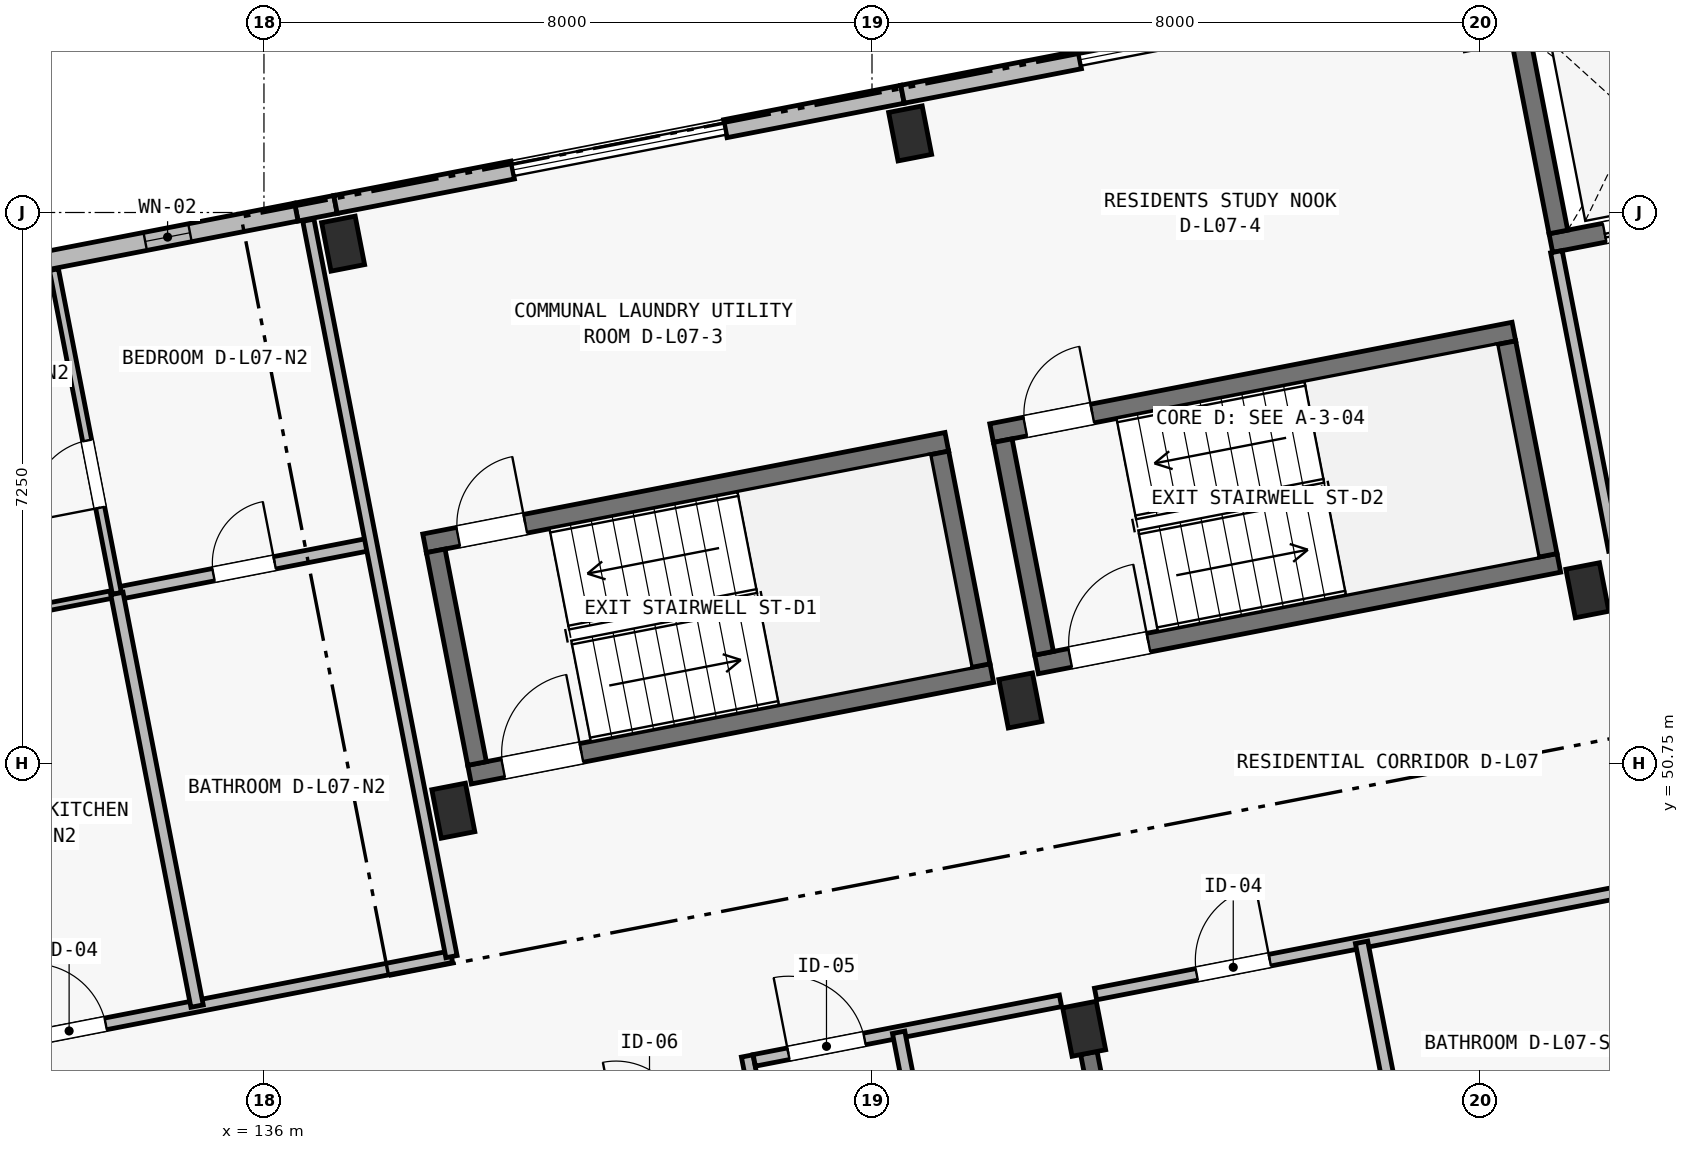
"""IFC4 building model, lengths in metres.
Left out: names, types, materials, properties, quantities, classifications, styles, units other than length and angle.
Written with IfcOpenShell. Run it as: python <this file> out.ifc"""

import sys

from ifc_helpers import new_model, si_unit, direction, frame, frame_2d, origin, origin_2d, place, context, subcontext, project, spatial, polyline, rectangle, outline, extrude, element, fill, save


model = new_model("IFC4")
c1 = context("Model", 3, precision=1e-05, world=origin(), true_north=direction((0.0, 1.0)))
c2 = subcontext(c1, "Body", "Model", "MODEL_VIEW")
j1 = project(units=[si_unit("LENGTHUNIT", "METRE"), si_unit("PLANEANGLEUNIT", "RADIAN")], contexts=[c1])
p1 = place(None, origin())
s1 = spatial("IfcSite", under=j1, at=p1, CompositionType="ELEMENT")
p2 = place(p1, origin())
s2 = spatial("IfcBuilding", under=s1, at=p2, CompositionType="ELEMENT")
p3 = place(p2, frame((0.0, 0.0, 24.65)))
s3 = spatial("IfcBuildingStorey", under=s2, at=p3, CompositionType="ELEMENT", Elevation=24.65)
for number, where, z_axis, x_axis in (
    (1, (138.491, 50.13, 0.0), (0.0, 0.0, 1.0), (0.982, 0.191, 0.0)),
    (2, (137.041, 57.59, 0.0), (0.0, 0.0, 1.0), (0.982, 0.191, 0.0)),
    (3, (146.791, 47.261, 0.0), (0.0, 0.0, 1.0), (0.982, 0.191, 0.0)),
    (4, (145.952, 51.58, 0.0), (0.0, 0.0, 1.0), (0.982, 0.191, 0.0)),
    (5, (144.502, 59.041, 0.0), (0.0, 0.0, 1.0), (0.982, 0.191, 0.0)),
    (6, (153.412, 53.03, 0.0), (0.0, 0.0, 1.0), (0.982, 0.191, 0.0)),
):
    element("IfcColumn", number, at=place(p3, frame(where, z_axis=z_axis, x_axis=x_axis)), inside=s3, PredefinedType="COLUMN", context=c2, shape_type="SweptSolid", body=[
        extrude(rectangle(XDim=0.45, YDim=0.65, at=origin_2d()), origin(), (0.0, 0.0, 1.0), 3.25),
    ])
p4 = place(p3, frame((148.179, 40.12, 0.0), z_axis=(0.0, 0.0, 1.0), x_axis=(-0.190817005532, 0.981625626397, 0.0)))
e7 = element("IfcWall", 7, at=p4, inside=s3, PredefinedType="SHEAR", context=c2, shape_type="SweptSolid", body=[
    extrude(rectangle(XDim=6.95, YDim=0.22, at=frame_2d((3.475, 0.0))), origin(), (0.0, 0.0, 1.0), 2.5),
])
p5 = place(p3, frame((152.932, 57.598, 0.0), z_axis=(0.0, 0.0, 1.0), x_axis=(0.981636759622, 0.190759723627, 0.0)))
e8 = element("IfcWall", 8, at=p5, inside=s3, PredefinedType="SHEAR", context=c2, shape_type="SweptSolid", body=[
    extrude(rectangle(XDim=2.675, YDim=0.25, at=frame_2d((1.337, 0.0))), origin(), (0.0, 0.0, 1.0), 3.25),
])
p6 = place(p5, frame((0.72, 0.0, 0.0)))
e9 = element("IfcOpeningElement", 9, at=p6, cuts=e8, PredefinedType="OPENING", context=c2, shape_type="SweptSolid", body=[
    extrude(rectangle(XDim=1.2, YDim=2.2, at=frame_2d((0.6, 1.1))), frame((0.0, 0.14, 0.0), z_axis=(0.0, -1.0, 0.0), x_axis=(1.0, 0.0, 0.0)), (0.0, 0.0, 1.0), 0.28),
])
p7 = place(p3, frame((153.031, 57.744, 0.0), z_axis=(0.0, 0.0, 1.0), x_axis=(-0.190810719655, 0.98162684828, 0.0)))
e10 = element("IfcWall", 10, at=p7, inside=s3, PredefinedType="SHEAR", context=c2, shape_type="SweptSolid", body=[
    extrude(rectangle(XDim=2.55, YDim=0.25, at=frame_2d((1.275, 0.0))), origin(), (0.0, 0.0, 1.0), 3.25),
])
p8 = place(p3, frame((138.113, 53.647, 0.0), z_axis=(0.0, 0.0, 1.0), x_axis=(0.981626097708, 0.19081458094, 0.0)))
e11 = element("IfcWall", 11, at=p8, inside=s3, PredefinedType="SHEAR", context=c2, shape_type="SweptSolid", body=[
    extrude(rectangle(XDim=7.0, YDim=0.25, at=frame_2d((3.5, 0.0))), origin(), (0.0, 0.0, 1.0), 3.25),
])
p9 = place(p8, frame((0.45, 0.0, 0.0)))
e12 = element("IfcOpeningElement", 12, at=p9, cuts=e11, PredefinedType="OPENING", context=c2, shape_type="SweptSolid", body=[
    extrude(rectangle(XDim=0.9, YDim=2.1, at=frame_2d((0.45, 1.05))), frame((0.0, 0.14, 0.0), z_axis=(0.0, -1.0, 0.0), x_axis=(1.0, 0.0, 0.0)), (0.0, 0.0, 1.0), 0.28),
])
p10 = place(p3, frame((138.705, 50.604, 0.0), z_axis=(0.0, 0.0, 1.0), x_axis=(0.981626097708, 0.19081458094, 0.0)))
e13 = element("IfcWall", 13, at=p10, inside=s3, PredefinedType="SHEAR", context=c2, shape_type="SweptSolid", body=[
    extrude(rectangle(XDim=7.0, YDim=0.25, at=frame_2d((3.5, 0.0))), origin(), (0.0, 0.0, 1.0), 3.25),
])
p11 = place(p10, frame((0.45, 0.0, 0.0)))
e14 = element("IfcOpeningElement", 14, at=p11, cuts=e13, PredefinedType="OPENING", context=c2, shape_type="SweptSolid", body=[
    extrude(rectangle(XDim=1.05, YDim=2.15, at=frame_2d((0.525, 1.075))), frame((0.0, 0.14, 0.0), z_axis=(0.0, -1.0, 0.0), x_axis=(1.0, 0.0, 0.0)), (0.0, 0.0, 1.0), 0.28),
])
p12 = place(p3, frame((138.804, 50.751, 0.0), z_axis=(0.0, 0.0, 1.0), x_axis=(-0.190858194834, 0.981617618762, 0.0)))
e15 = element("IfcWall", 15, at=p12, inside=s3, PredefinedType="SHEAR", context=c2, shape_type="SweptSolid", body=[
    extrude(rectangle(XDim=2.85, YDim=0.25, at=frame_2d((1.425, 0.0))), origin(), (0.0, 0.0, 1.0), 3.25),
])
p13 = place(p3, frame((145.43, 52.039, 0.0), z_axis=(0.0, 0.0, 1.0), x_axis=(-0.190842147128, 0.981620738819, 0.0)))
e16 = element("IfcWall", 16, at=p13, inside=s3, PredefinedType="SHEAR", context=c2, shape_type="SweptSolid", body=[
    extrude(rectangle(XDim=2.85, YDim=0.25, at=frame_2d((1.425, 0.0))), origin(), (0.0, 0.0, 1.0), 3.25),
])
p14 = place(p3, frame((145.574, 55.098, 0.0), z_axis=(0.0, 0.0, 1.0), x_axis=(0.981626097708, 0.19081458094, 0.0)))
e17 = element("IfcWall", 17, at=p14, inside=s3, PredefinedType="SHEAR", context=c2, shape_type="SweptSolid", body=[
    extrude(rectangle(XDim=7.0, YDim=0.25, at=frame_2d((3.5, 0.0))), origin(), (0.0, 0.0, 1.0), 3.25),
])
p15 = place(p14, frame((0.45, 0.0, 0.0)))
e18 = element("IfcOpeningElement", 18, at=p15, cuts=e17, PredefinedType="OPENING", context=c2, shape_type="SweptSolid", body=[
    extrude(rectangle(XDim=0.9, YDim=2.1, at=frame_2d((0.45, 1.05))), frame((0.0, 0.14, 0.0), z_axis=(0.0, -1.0, 0.0), x_axis=(1.0, 0.0, 0.0)), (0.0, 0.0, 1.0), 0.28),
])
p16 = place(p3, frame((146.165, 52.054, 0.0), z_axis=(0.0, 0.0, 1.0), x_axis=(0.981627367538, 0.190808048312, 0.0)))
e19 = element("IfcWall", 19, at=p16, inside=s3, PredefinedType="SHEAR", context=c2, shape_type="SweptSolid", body=[
    extrude(rectangle(XDim=7.0, YDim=0.25, at=frame_2d((3.5, 0.0))), origin(), (0.0, 0.0, 1.0), 3.25),
])
p17 = place(p16, frame((0.45, 0.0, 0.0)))
e20 = element("IfcOpeningElement", 20, at=p17, cuts=e19, PredefinedType="OPENING", context=c2, shape_type="SweptSolid", body=[
    extrude(rectangle(XDim=1.05, YDim=2.15, at=frame_2d((0.525, 1.075))), frame((0.0, 0.14, 0.0), z_axis=(0.0, -1.0, 0.0), x_axis=(1.0, 0.0, 0.0)), (0.0, 0.0, 1.0), 0.28),
])
for number, where, z_axis, x_axis in (
    (21, (146.264, 52.201, 0.0), (0.0, 0.0, 1.0), (-0.191, 0.982, 0.0)),
    (22, (152.89, 53.489, 0.0), (0.0, 0.0, 1.0), (-0.191, 0.982, 0.0)),
):
    element("IfcWall", number, at=place(p3, frame(where, z_axis=z_axis, x_axis=x_axis)), inside=s3, PredefinedType="SHEAR", context=c2, shape_type="SweptSolid", body=[
        extrude(rectangle(XDim=2.85, YDim=0.25, at=frame_2d((1.425, 0.0))), origin(), (0.0, 0.0, 1.0), 3.25),
    ])
p18 = place(p3, frame((136.426, 58.006, 0.0), z_axis=(0.0, 0.0, 1.0), x_axis=(0.981656509867, 0.190658062077, 0.0)))
e23 = element("IfcWall", 23, at=p18, inside=s3, PredefinedType="SOLIDWALL", context=c2, shape_type="SweptSolid", body=[
    extrude(rectangle(XDim=0.525, YDim=0.24, at=frame_2d((0.262, 0.0))), origin(), (0.0, 0.0, 1.0), 3.0),
])
p19 = place(p3, frame((129.481, 56.656, 0.0), z_axis=(0.0, 0.0, 1.0), x_axis=(0.981624188584, 0.190824401971, 0.0)))
e24 = element("IfcWall", 24, at=p19, inside=s3, PredefinedType="SOLIDWALL", context=c2, shape_type="SweptSolid", body=[
    extrude(outline(polyline([(0.0, 0.0), (7.075, 0.0), (7.075, 6.555), (0.0, 5.091), (0.0, 0.0)])), frame((0.0, 0.12, 0.0), z_axis=(0.0, -1.0, 0.0), x_axis=(1.0, 0.0, 0.0)), (0.0, 0.0, 1.0), 0.24),
])
p20 = place(p19, frame((1.745, 0.0, 0.5)))
e25 = element("IfcOpeningElement", 25, at=p20, cuts=e24, PredefinedType="OPENING", context=c2, shape_type="SweptSolid", body=[
    extrude(rectangle(XDim=0.82, YDim=2.18, at=frame_2d((0.41, 1.09))), frame((0.0, 0.135, 0.0), z_axis=(0.0, -1.0, 0.0), x_axis=(1.0, 0.0, 0.0)), (0.0, 0.0, 1.0), 0.27),
])
p21 = place(p19, frame((5.05, 0.0, 0.44)))
e26 = element("IfcOpeningElement", 26, at=p21, cuts=e24, PredefinedType="OPENING", context=c2, shape_type="SweptSolid", body=[
    extrude(rectangle(XDim=0.6, YDim=2.22, at=frame_2d((0.3, 1.11))), frame((0.0, 0.135, 0.0), z_axis=(0.0, -1.0, 0.0), x_axis=(1.0, 0.0, 0.0)), (0.0, 0.0, 1.0), 0.27),
])
for number, where, z_axis, x_axis in (
    (27, (136.941, 58.106, 0.0), (0.0, 0.0, 1.0), (0.982, 0.191, 0.0)),
    (28, (142.07, 59.103, 0.0), (0.0, 0.0, 1.0), (0.982, 0.191, 0.0)),
):
    element("IfcWall", number, at=place(p3, frame(where, z_axis=z_axis, x_axis=x_axis)), inside=s3, PredefinedType="SOLIDWALL", context=c2, shape_type="SweptSolid", body=[
        extrude(rectangle(XDim=2.375, YDim=0.24, at=frame_2d((1.188, 0.0))), origin(), (0.0, 0.0, 1.0), 3.0),
    ])
p22 = place(p3, frame((144.401, 59.556, 0.0), z_axis=(0.0, 0.0, 1.0), x_axis=(0.981633573872, 0.190776116556, 0.0)))
e29 = element("IfcWall", 29, at=p22, inside=s3, PredefinedType="SOLIDWALL", context=c2, shape_type="SweptSolid", body=[
    extrude(rectangle(XDim=2.375, YDim=0.24, at=frame_2d((1.188, 0.0))), origin(), (0.0, 0.0, 1.0), 3.0),
])
p23 = place(p3, frame((153.768, 53.558, 0.0), z_axis=(0.0, 0.0, 1.0), x_axis=(-0.19085495634, 0.981618248425, 0.0)))
e30 = element("IfcWall", 30, at=p23, inside=s3, PredefinedType="PARTITIONING", context=c2, shape_type="SweptSolid", body=[
    extrude(rectangle(XDim=4.0, YDim=0.155, at=frame_2d((2.0, 0.0))), origin(), (0.0, 0.0, 1.0), 2.97),
])
p24 = place(p3, frame((142.548, 45.927, 0.0), z_axis=(0.0, 0.0, 1.0), x_axis=(-0.190639805817, 0.981660055436, 0.0)))
e31 = element("IfcWall", 31, at=p24, inside=s3, PredefinedType="PARTITIONING", context=c2, shape_type="SweptSolid", body=[
    extrude(rectangle(XDim=0.995, YDim=0.155, at=frame_2d((0.498, 0.0))), origin(), (0.0, 0.0, 1.0), 2.97),
])
p25 = place(p3, frame((142.451, 46.845, 0.0), z_axis=(0.0, 0.0, 1.0), x_axis=(0.981629934904, 0.190794839817, 0.0)))
e32 = element("IfcWall", 32, at=p25, inside=s3, PredefinedType="PARTITIONING", context=c2, shape_type="SweptSolid", body=[
    extrude(rectangle(XDim=4.105, YDim=0.155, at=frame_2d((2.052, 0.0))), origin(), (0.0, 0.0, 1.0), 2.97),
])
p26 = place(p25, frame((0.458, 0.0, 0.0)))
e33 = element("IfcOpeningElement", 33, at=p26, cuts=e32, PredefinedType="OPENING", context=c2, shape_type="SweptSolid", body=[
    extrude(rectangle(XDim=1.02, YDim=2.2, at=frame_2d((0.51, 1.1))), frame((0.0, 0.093, 0.0), z_axis=(0.0, -1.0, 0.0), x_axis=(1.0, 0.0, 0.0)), (0.0, 0.0, 1.0), 0.185),
])
p27 = place(p3, frame((145.127, 43.219, 0.0), z_axis=(0.0, 0.0, 1.0), x_axis=(-0.19081827974, 0.981625378705, 0.0)))
e34 = element("IfcWall", 34, at=p27, inside=s3, PredefinedType="PLUMBINGWALL", context=c2, shape_type="SweptSolid", body=[
    extrude(rectangle(XDim=4.07, YDim=0.165, at=frame_2d((2.035, 0.0))), origin(), (0.0, 0.0, 1.0), 2.97),
])
p28 = place(p3, frame((146.942, 47.718, 0.0), z_axis=(0.0, 0.0, 1.0), x_axis=(0.981623942594, 0.190825667367, 0.0)))
e35 = element("IfcWall", 35, at=p28, inside=s3, PredefinedType="PARTITIONING", context=c2, shape_type="SweptSolid", body=[
    extrude(rectangle(XDim=7.13, YDim=0.155, at=frame_2d((3.565, 0.0))), origin(), (0.0, 0.0, 1.0), 2.97),
])
p29 = place(p28, frame((1.355, 0.0, 0.0)))
e36 = element("IfcOpeningElement", 36, at=p29, cuts=e35, PredefinedType="OPENING", context=c2, shape_type="SweptSolid", body=[
    extrude(rectangle(XDim=0.98, YDim=2.15, at=frame_2d((0.49, 1.075))), frame((0.0, 0.093, 0.0), z_axis=(0.0, -1.0, 0.0), x_axis=(1.0, 0.0, 0.0)), (0.0, 0.0, 1.0), 0.185),
])
p30 = place(p3, frame((151.218, 44.403, 0.0), z_axis=(0.0, 0.0, 1.0), x_axis=(-0.190807044121, 0.981627562731, 0.0)))
e37 = element("IfcWall", 37, at=p30, inside=s3, PredefinedType="PLUMBINGWALL", context=c2, shape_type="SweptSolid", body=[
    extrude(rectangle(XDim=4.07, YDim=0.165, at=frame_2d((2.035, 0.0))), origin(), (0.0, 0.0, 1.0), 2.97),
])
p31 = place(p3, frame((131.772, 46.909, 0.0), z_axis=(0.0, 0.0, 1.0), x_axis=(0.981622468528, 0.190833249935, 0.0)))
e38 = element("IfcWall", 38, at=p31, inside=s3, PredefinedType="PARTITIONING", context=c2, shape_type="SweptSolid", body=[
    extrude(rectangle(XDim=6.82, YDim=0.155, at=frame_2d((3.41, 0.0))), origin(), (0.0, 0.0, 1.0), 2.97),
])
p32 = place(p31, frame((1.205, 0.0, 0.0)))
e39 = element("IfcOpeningElement", 39, at=p32, cuts=e38, PredefinedType="OPENING", context=c2, shape_type="SweptSolid", body=[
    extrude(rectangle(XDim=0.98, YDim=2.15, at=frame_2d((0.49, 1.075))), frame((0.0, 0.093, 0.0), z_axis=(0.0, -1.0, 0.0), x_axis=(1.0, 0.0, 0.0)), (0.0, 0.0, 1.0), 0.185),
])
p33 = place(p3, frame((130.717, 52.337, 0.0), z_axis=(0.0, 0.0, 1.0), x_axis=(0.981629173664, 0.190798756314, 0.0)))
e40 = element("IfcWall", 40, at=p33, inside=s3, PredefinedType="PARTITIONING", context=c2, shape_type="SweptSolid", body=[
    extrude(rectangle(XDim=3.41, YDim=0.1, at=frame_2d((1.705, 0.0))), origin(), (0.0, 0.0, 1.0), 2.97),
])
p34 = place(p33, frame((1.255, 0.0, 0.0)))
e41 = element("IfcOpeningElement", 41, at=p34, cuts=e40, PredefinedType="OPENING", context=c2, shape_type="SweptSolid", body=[
    extrude(rectangle(XDim=0.88, YDim=2.1, at=frame_2d((0.44, 1.05))), frame((0.0, 0.065, 0.0), z_axis=(0.0, -1.0, 0.0), x_axis=(1.0, 0.0, 0.0)), (0.0, 0.0, 1.0), 0.13),
])
p35 = place(p3, frame((134.065, 52.988, 0.0), z_axis=(0.0, 0.0, 1.0), x_axis=(0.981629173664, 0.190798756314, 0.0)))
e42 = element("IfcWall", 42, at=p35, inside=s3, PredefinedType="PLUMBINGWALL", context=c2, shape_type="SweptSolid", body=[
    extrude(rectangle(XDim=3.41, YDim=0.165, at=frame_2d((1.705, 0.0))), origin(), (0.0, 0.0, 1.0), 2.97),
])
p36 = place(p35, frame((1.295, 0.0, 0.0)))
e43 = element("IfcOpeningElement", 43, at=p36, cuts=e42, PredefinedType="OPENING", context=c2, shape_type="SweptSolid", body=[
    extrude(rectangle(XDim=0.82, YDim=2.08, at=frame_2d((0.41, 1.04))), frame((0.0, 0.097, 0.0), z_axis=(0.0, -1.0, 0.0), x_axis=(1.0, 0.0, 0.0)), (0.0, 0.0, 1.0), 0.195),
])
p37 = place(p3, frame((134.065, 52.988, 0.0), z_axis=(0.0, 0.0, 1.0), x_axis=(-0.190812443151, 0.981626513262, 0.0)))
e44 = element("IfcWall", 44, at=p37, inside=s3, PredefinedType="PARTITIONING", context=c2, shape_type="SweptSolid", body=[
    extrude(rectangle(XDim=4.34, YDim=0.12, at=frame_2d((2.17, 0.0))), origin(), (0.0, 0.0, 1.0), 2.97),
])
p38 = place(p37, frame((1.15, 0.0, 0.0)))
e45 = element("IfcOpeningElement", 45, at=p38, cuts=e44, PredefinedType="OPENING", context=c2, shape_type="SweptSolid", body=[
    extrude(rectangle(XDim=0.9, YDim=2.1, at=frame_2d((0.45, 1.05))), frame((0.0, 0.075, 0.0), z_axis=(0.0, -1.0, 0.0), x_axis=(1.0, 0.0, 0.0)), (0.0, 0.0, 1.0), 0.15),
])
p39 = place(p3, frame((135.12, 47.559, 0.0), z_axis=(0.0, 0.0, 1.0), x_axis=(-0.190807031124, 0.981627565258, 0.0)))
e46 = element("IfcWall", 46, at=p39, inside=s3, PredefinedType="PLUMBINGWALL", context=c2, shape_type="SweptSolid", body=[
    extrude(rectangle(XDim=5.53, YDim=0.165, at=frame_2d((2.765, 0.0))), origin(), (0.0, 0.0, 1.0), 2.97),
])
p40 = place(p3, frame((138.467, 48.21, 0.0), z_axis=(0.0, 0.0, 1.0), x_axis=(-0.190814044018, 0.981626202078, 0.0)))
e47 = element("IfcWall", 47, at=p40, inside=s3, PredefinedType="PARTITIONING", context=c2, shape_type="SweptSolid", body=[
    extrude(rectangle(XDim=9.87, YDim=0.15, at=frame_2d((4.935, 0.0))), origin(), (0.0, 0.0, 1.0), 2.97),
])
p41 = place(p21, origin())
e48 = element("IfcWindow", 48, at=p41, inside=s3, PartitioningType="SINGLE_PANEL", PredefinedType="WINDOW", context=c2, shape_type="SweptSolid", body=[
    extrude(rectangle(XDim=0.6, YDim=2.22, at=frame_2d((0.3, 1.11))), frame((0.0, 0.03, 0.0), z_axis=(0.0, -1.0, 0.0), x_axis=(1.0, 0.0, 0.0)), (0.0, 0.0, 1.0), 0.06),
])
fill(e26, e48)
p42 = place(p26, origin())
e49 = element("IfcDoor", 49, at=p42, inside=s3, OperationType="SINGLE_SWING_LEFT", PredefinedType="DOOR", context=c2, shape_type="SweptSolid", body=[
    extrude(rectangle(XDim=1.02, YDim=2.2, at=frame_2d((0.51, 1.1))), frame((0.0, 0.025, 0.0), z_axis=(0.0, -1.0, 0.0), x_axis=(1.0, 0.0, 0.0)), (0.0, 0.0, 1.0), 0.05),
])
fill(e33, e49)
p43 = place(p29, origin())
e50 = element("IfcDoor", 50, at=p43, inside=s3, OperationType="SINGLE_SWING_RIGHT", PredefinedType="DOOR", context=c2, shape_type="SweptSolid", body=[
    extrude(rectangle(XDim=0.98, YDim=2.15, at=frame_2d((0.49, 1.075))), frame((0.0, 0.025, 0.0), z_axis=(0.0, -1.0, 0.0), x_axis=(1.0, 0.0, 0.0)), (0.0, 0.0, 1.0), 0.05),
])
fill(e36, e50)
p44 = place(p32, origin())
e51 = element("IfcDoor", 51, at=p44, inside=s3, OperationType="SINGLE_SWING_LEFT", PredefinedType="DOOR", context=c2, shape_type="SweptSolid", body=[
    extrude(rectangle(XDim=0.98, YDim=2.15, at=frame_2d((0.49, 1.075))), frame((0.0, 0.025, 0.0), z_axis=(0.0, -1.0, 0.0), x_axis=(1.0, 0.0, 0.0)), (0.0, 0.0, 1.0), 0.05),
])
fill(e39, e51)
p45 = place(p36, origin())
e52 = element("IfcDoor", 52, at=p45, inside=s3, OperationType="SINGLE_SWING_RIGHT", PredefinedType="DOOR", context=c2, shape_type="SweptSolid", body=[
    extrude(rectangle(XDim=0.82, YDim=2.08, at=frame_2d((0.41, 1.04))), frame((0.0, 0.025, 0.0), z_axis=(0.0, -1.0, 0.0), x_axis=(1.0, 0.0, 0.0)), (0.0, 0.0, 1.0), 0.05),
])
fill(e43, e52)
p46 = place(p38, origin())
e53 = element("IfcDoor", 53, at=p46, inside=s3, OperationType="SINGLE_SWING_LEFT", PredefinedType="DOOR", context=c2, shape_type="SweptSolid", body=[
    extrude(rectangle(XDim=0.9, YDim=2.1, at=frame_2d((0.45, 1.05))), frame((0.0, 0.025, 0.0), z_axis=(0.0, -1.0, 0.0), x_axis=(1.0, 0.0, 0.0)), (0.0, 0.0, 1.0), 0.05),
])
fill(e45, e53)
p47 = place(p11, origin())
e54 = element("IfcDoor", 54, at=p47, inside=s3, OperationType="SINGLE_SWING_RIGHT", PredefinedType="DOOR", context=c2, shape_type="SweptSolid", body=[
    extrude(rectangle(XDim=1.05, YDim=2.15, at=frame_2d((0.525, 1.075))), frame((0.0, 0.025, 0.0), z_axis=(0.0, -1.0, 0.0), x_axis=(1.0, 0.0, 0.0)), (0.0, 0.0, 1.0), 0.05),
])
fill(e14, e54)
p48 = place(p9, origin())
e55 = element("IfcDoor", 55, at=p48, inside=s3, OperationType="SINGLE_SWING_RIGHT", PredefinedType="DOOR", context=c2, shape_type="SweptSolid", body=[
    extrude(rectangle(XDim=0.9, YDim=2.1, at=frame_2d((0.45, 1.05))), frame((0.0, 0.025, 0.0), z_axis=(0.0, -1.0, 0.0), x_axis=(1.0, 0.0, 0.0)), (0.0, 0.0, 1.0), 0.05),
])
fill(e12, e55)
p49 = place(p17, origin())
e56 = element("IfcDoor", 56, at=p49, inside=s3, OperationType="SINGLE_SWING_RIGHT", PredefinedType="DOOR", context=c2, shape_type="SweptSolid", body=[
    extrude(rectangle(XDim=1.05, YDim=2.15, at=frame_2d((0.525, 1.075))), frame((0.0, 0.025, 0.0), z_axis=(0.0, -1.0, 0.0), x_axis=(1.0, 0.0, 0.0)), (0.0, 0.0, 1.0), 0.05),
])
fill(e20, e56)
p50 = place(p15, origin())
e57 = element("IfcDoor", 57, at=p50, inside=s3, OperationType="SINGLE_SWING_RIGHT", PredefinedType="DOOR", context=c2, shape_type="SweptSolid", body=[
    extrude(rectangle(XDim=0.9, YDim=2.1, at=frame_2d((0.45, 1.05))), frame((0.0, 0.025, 0.0), z_axis=(0.0, -1.0, 0.0), x_axis=(1.0, 0.0, 0.0)), (0.0, 0.0, 1.0), 0.05),
])
fill(e18, e57)
p51 = place(p6, origin())
e58 = element("IfcDoor", 58, at=p51, inside=s3, OperationType="DOUBLE_DOOR_SLIDING", PredefinedType="DOOR", context=c2, shape_type="SweptSolid", body=[
    extrude(rectangle(XDim=1.2, YDim=2.2, at=frame_2d((0.6, 1.1))), frame((0.0, 0.025, 0.0), z_axis=(0.0, -1.0, 0.0), x_axis=(1.0, 0.0, 0.0)), (0.0, 0.0, 1.0), 0.05),
])
fill(e9, e58)
save(model, sys.argv[1])
